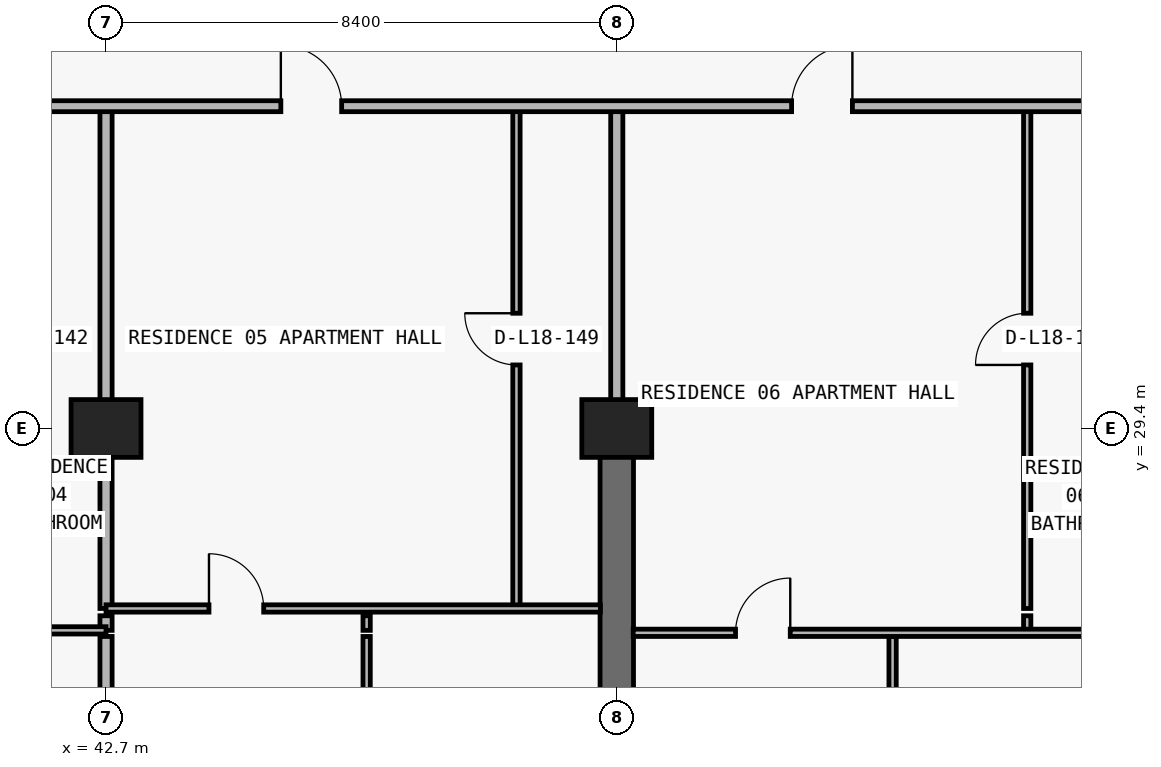
"""IFC4 building model, lengths in metres.
Left out: names, types, materials, properties, quantities, classifications, styles, units other than length and angle.
Written with IfcOpenShell. Run it as: python <this file> out.ifc"""

import sys

from ifc_helpers import new_model, si_unit, direction, frame, frame_2d, origin, origin_2d, place, context, subcontext, project, spatial, rectangle, extrude, element, fill, save


model = new_model("IFC4")
c1 = context("Model", 3, precision=1e-05, world=origin(), true_north=direction((0.0, 1.0)))
c2 = subcontext(c1, "Body", "Model", "MODEL_VIEW")
j1 = project(units=[si_unit("LENGTHUNIT", "METRE"), si_unit("PLANEANGLEUNIT", "RADIAN")], contexts=[c1])
p1 = place(None, origin())
s1 = spatial("IfcSite", under=j1, at=p1, CompositionType="ELEMENT")
p2 = place(p1, origin())
s2 = spatial("IfcBuilding", under=s1, at=p2, CompositionType="ELEMENT")
p3 = place(p2, frame((0.0, 0.0, 69.6)))
s3 = spatial("IfcBuildingStorey", under=s2, at=p3, CompositionType="ELEMENT", Elevation=69.6)
for number, where, z_axis, x_axis in (
    (1, (42.7, 29.4, 0.0), (0.0, 0.0, 1.0), (1.0, 0.0, 0.0)),
    (2, (51.1, 29.4, 0.0), (0.0, 0.0, 1.0), (1.0, 0.0, 0.0)),
):
    element("IfcColumn", number, at=place(p3, frame(where, z_axis=z_axis, x_axis=x_axis)), inside=s3, PredefinedType="COLUMN", context=c2, shape_type="SweptSolid", body=[
        extrude(rectangle(XDim=1.15, YDim=0.95, at=origin_2d()), origin(), (0.0, 0.0, 1.0), 3.05),
    ])
p4 = place(p3, frame((51.1, 20.8, 0.0), z_axis=(0.0, 0.0, 1.0), x_axis=(0.0, 1.0, 0.0)))
e3 = element("IfcWall", 3, at=p4, inside=s3, PredefinedType="SHEAR", context=c2, shape_type="SweptSolid", body=[
    extrude(rectangle(XDim=8.6, YDim=0.55, at=frame_2d((4.3, 0.0))), origin(), (0.0, 0.0, 1.0), 3.05),
])
p5 = place(p3, frame((42.7, 21.29, 0.0), z_axis=(0.0, 0.0, 1.0), x_axis=(0.0, 1.0, 0.0)))
e4 = element("IfcWall", 4, at=p5, inside=s3, PredefinedType="PARTITIONING", context=c2, shape_type="SweptSolid", body=[
    extrude(rectangle(XDim=4.69, YDim=0.2, at=frame_2d((2.345, 0.0))), origin(), (0.0, 0.0, 1.0), 2.11),
])
p6 = place(p3, frame((42.7, 26.08, 0.0), z_axis=(0.0, 0.0, 1.0), x_axis=(0.0, 1.0, 0.0)))
e5 = element("IfcWall", 5, at=p6, inside=s3, PredefinedType="PARTITIONING", context=c2, shape_type="SweptSolid", body=[
    extrude(rectangle(XDim=0.24, YDim=0.2, at=frame_2d((0.12, 0.0))), origin(), (0.0, 0.0, 1.0), 2.11),
])
p7 = place(p3, frame((42.7, 26.44, 0.0), z_axis=(0.0, 0.0, 1.0), x_axis=(0.0, 1.0, 0.0)))
e6 = element("IfcWall", 6, at=p7, inside=s3, PredefinedType="PARTITIONING", context=c2, shape_type="SweptSolid", body=[
    extrude(rectangle(XDim=8.26, YDim=0.2, at=frame_2d((4.13, 0.0))), origin(), (0.0, 0.0, 1.0), 2.11),
])
p8 = place(p3, frame((46.986, 21.29, 0.0), z_axis=(0.0, 0.0, 1.0), x_axis=(0.0, 1.0, 0.0)))
e7 = element("IfcWall", 7, at=p8, inside=s3, PredefinedType="PARTITIONING", context=c2, shape_type="SweptSolid", body=[
    extrude(rectangle(XDim=4.69, YDim=0.12, at=frame_2d((2.345, 0.0))), origin(), (0.0, 0.0, 1.0), 3.05),
])
p9 = place(p8, frame((1.895, 0.0, 0.0)))
e8 = element("IfcOpeningElement", 8, at=p9, cuts=e7, PredefinedType="OPENING", context=c2, shape_type="SweptSolid", body=[
    extrude(rectangle(XDim=0.9, YDim=2.15, at=frame_2d((0.45, 1.075))), frame((0.0, 0.07, 0.0), z_axis=(0.0, -1.0, 0.0), x_axis=(1.0, 0.0, 0.0)), (0.0, 0.0, 1.0), 0.14),
])
p10 = place(p3, frame((46.986, 26.08, 0.0), z_axis=(0.0, 0.0, 1.0), x_axis=(0.0, 1.0, 0.0)))
e9 = element("IfcWall", 9, at=p10, inside=s3, PredefinedType="PARTITIONING", context=c2, shape_type="SweptSolid", body=[
    extrude(rectangle(XDim=0.24, YDim=0.12, at=frame_2d((0.12, 0.0))), origin(), (0.0, 0.0, 1.0), 3.05),
])
p11 = place(p3, frame((49.45, 26.44, 0.0), z_axis=(0.0, 0.0, 1.0), x_axis=(0.0, 1.0, 0.0)))
e10 = element("IfcWall", 10, at=p11, inside=s3, PredefinedType="PARTITIONING", context=c2, shape_type="SweptSolid", body=[
    extrude(rectangle(XDim=8.26, YDim=0.12, at=frame_2d((4.13, 0.0))), origin(), (0.0, 0.0, 1.0), 3.05),
])
p12 = place(p11, frame((4.005, 0.0, 0.0)))
e11 = element("IfcOpeningElement", 11, at=p12, cuts=e10, PredefinedType="OPENING", context=c2, shape_type="SweptSolid", body=[
    extrude(rectangle(XDim=0.85, YDim=2.1, at=frame_2d((0.425, 1.05))), frame((0.0, 0.07, 0.0), z_axis=(0.0, -1.0, 0.0), x_axis=(1.0, 0.0, 0.0)), (0.0, 0.0, 1.0), 0.14),
])
p13 = place(p3, frame((51.1, 29.405, 0.0), z_axis=(0.0, 0.0, 1.0), x_axis=(0.0, 1.0, 0.0)))
e12 = element("IfcWall", 12, at=p13, inside=s3, PredefinedType="PARTITIONING", context=c2, shape_type="SweptSolid", body=[
    extrude(rectangle(XDim=5.295, YDim=0.2, at=frame_2d((2.647, 0.0))), origin(), (0.0, 0.0, 1.0), 2.335),
])
p14 = place(p3, frame((55.636, 21.29, 0.0), z_axis=(0.0, 0.0, 1.0), x_axis=(0.0, 1.0, 0.0)))
e13 = element("IfcWall", 13, at=p14, inside=s3, PredefinedType="PARTITIONING", context=c2, shape_type="SweptSolid", body=[
    extrude(rectangle(XDim=4.69, YDim=0.12, at=frame_2d((2.345, 0.0))), origin(), (0.0, 0.0, 1.0), 3.05),
])
p15 = place(p14, frame((1.895, 0.0, 0.0)))
e14 = element("IfcOpeningElement", 14, at=p15, cuts=e13, PredefinedType="OPENING", context=c2, shape_type="SweptSolid", body=[
    extrude(rectangle(XDim=0.9, YDim=2.15, at=frame_2d((0.45, 1.075))), frame((0.0, 0.07, 0.0), z_axis=(0.0, -1.0, 0.0), x_axis=(1.0, 0.0, 0.0)), (0.0, 0.0, 1.0), 0.14),
])
p16 = place(p3, frame((57.85, 26.08, 0.0), z_axis=(0.0, 0.0, 1.0), x_axis=(0.0, 1.0, 0.0)))
e15 = element("IfcWall", 15, at=p16, inside=s3, PredefinedType="PARTITIONING", context=c2, shape_type="SweptSolid", body=[
    extrude(rectangle(XDim=0.24, YDim=0.12, at=frame_2d((0.12, 0.0))), origin(), (0.0, 0.0, 1.0), 3.05),
])
p17 = place(p3, frame((57.85, 26.44, 0.0), z_axis=(0.0, 0.0, 1.0), x_axis=(0.0, 1.0, 0.0)))
e16 = element("IfcWall", 16, at=p17, inside=s3, PredefinedType="PARTITIONING", context=c2, shape_type="SweptSolid", body=[
    extrude(rectangle(XDim=8.26, YDim=0.12, at=frame_2d((4.13, 0.0))), origin(), (0.0, 0.0, 1.0), 3.05),
])
p18 = place(p17, frame((4.005, 0.0, 0.0)))
e17 = element("IfcOpeningElement", 17, at=p18, cuts=e16, PredefinedType="OPENING", context=c2, shape_type="SweptSolid", body=[
    extrude(rectangle(XDim=0.85, YDim=2.1, at=frame_2d((0.425, 1.05))), frame((0.0, 0.07, 0.0), z_axis=(0.0, -1.0, 0.0), x_axis=(1.0, 0.0, 0.0)), (0.0, 0.0, 1.0), 0.14),
])
p19 = place(p3, frame((51.37, 26.04, 0.0), z_axis=(0.0, 0.0, 1.0), x_axis=(1.0, 0.0, 0.0)))
e18 = element("IfcWall", 18, at=p19, inside=s3, PredefinedType="PARTITIONING", context=c2, shape_type="SweptSolid", body=[
    extrude(rectangle(XDim=8.13, YDim=0.12, at=frame_2d((4.065, 0.0))), origin(), (0.0, 0.0, 1.0), 3.05),
])
p20 = place(p19, frame((1.683, 0.0, 0.0)))
e19 = element("IfcOpeningElement", 19, at=p20, cuts=e18, PredefinedType="OPENING", context=c2, shape_type="SweptSolid", body=[
    extrude(rectangle(XDim=0.9, YDim=2.15, at=frame_2d((0.45, 1.075))), frame((0.0, 0.07, 0.0), z_axis=(0.0, -1.0, 0.0), x_axis=(1.0, 0.0, 0.0)), (0.0, 0.0, 1.0), 0.14),
])
p21 = place(p3, frame((35.1, 26.08, 0.0), z_axis=(0.0, 0.0, 1.0), x_axis=(1.0, 0.0, 0.0)))
e20 = element("IfcWall", 20, at=p21, inside=s3, PredefinedType="PARTITIONING", context=c2, shape_type="SweptSolid", body=[
    extrude(rectangle(XDim=7.6, YDim=0.12, at=frame_2d((3.8, 0.0))), origin(), (0.0, 0.0, 1.0), 3.05),
])
p22 = place(p21, frame((1.727, 0.0, 0.0)))
e21 = element("IfcOpeningElement", 21, at=p22, cuts=e20, PredefinedType="OPENING", context=c2, shape_type="SweptSolid", body=[
    extrude(rectangle(XDim=0.9, YDim=2.15, at=frame_2d((0.45, 1.075))), frame((0.0, 0.07, 0.0), z_axis=(0.0, -1.0, 0.0), x_axis=(1.0, 0.0, 0.0)), (0.0, 0.0, 1.0), 0.14),
])
p23 = place(p3, frame((42.7, 26.44, 0.0), z_axis=(0.0, 0.0, 1.0), x_axis=(1.0, 0.0, 0.0)))
e22 = element("IfcWall", 22, at=p23, inside=s3, PredefinedType="PARTITIONING", context=c2, shape_type="SweptSolid", body=[
    extrude(rectangle(XDim=8.13, YDim=0.12, at=frame_2d((4.065, 0.0))), origin(), (0.0, 0.0, 1.0), 3.05),
])
p24 = place(p23, frame((1.693, 0.0, 0.0)))
e23 = element("IfcOpeningElement", 23, at=p24, cuts=e22, PredefinedType="OPENING", context=c2, shape_type="SweptSolid", body=[
    extrude(rectangle(XDim=0.9, YDim=2.15, at=frame_2d((0.45, 1.075))), frame((0.0, 0.07, 0.0), z_axis=(0.0, -1.0, 0.0), x_axis=(1.0, 0.0, 0.0)), (0.0, 0.0, 1.0), 0.14),
])
p25 = place(p3, frame((5.105, 34.7, 0.0), z_axis=(0.0, 0.0, 1.0), x_axis=(1.0, 0.0, 0.0)))
e24 = element("IfcWall", 24, at=p25, inside=s3, PredefinedType="PARTITIONING", context=c2, shape_type="SweptSolid", body=[
    extrude(rectangle(XDim=67.595, YDim=0.18, at=frame_2d((33.797, 0.0))), origin(), (0.0, 0.0, 1.0), 3.05),
])
p26 = place(p25, frame((7.67, 0.0, 0.0)))
e25 = element("IfcOpeningElement", 25, at=p26, cuts=e24, PredefinedType="OPENING", context=c2, shape_type="SweptSolid", body=[
    extrude(rectangle(XDim=1.0, YDim=2.2, at=frame_2d((0.5, 1.1))), frame((0.0, 0.1, 0.0), z_axis=(0.0, -1.0, 0.0), x_axis=(1.0, 0.0, 0.0)), (0.0, 0.0, 1.0), 0.2),
])
p27 = place(p25, frame((16.07, 0.0, 0.0)))
e26 = element("IfcOpeningElement", 26, at=p27, cuts=e24, PredefinedType="OPENING", context=c2, shape_type="SweptSolid", body=[
    extrude(rectangle(XDim=1.0, YDim=2.2, at=frame_2d((0.5, 1.1))), frame((0.0, 0.1, 0.0), z_axis=(0.0, -1.0, 0.0), x_axis=(1.0, 0.0, 0.0)), (0.0, 0.0, 1.0), 0.2),
])
p28 = place(p25, frame((24.47, 0.0, 0.0)))
e27 = element("IfcOpeningElement", 27, at=p28, cuts=e24, PredefinedType="OPENING", context=c2, shape_type="SweptSolid", body=[
    extrude(rectangle(XDim=1.0, YDim=2.2, at=frame_2d((0.5, 1.1))), frame((0.0, 0.1, 0.0), z_axis=(0.0, -1.0, 0.0), x_axis=(1.0, 0.0, 0.0)), (0.0, 0.0, 1.0), 0.2),
])
p29 = place(p25, frame((32.47, 0.0, 0.0)))
e28 = element("IfcOpeningElement", 28, at=p29, cuts=e24, PredefinedType="OPENING", context=c2, shape_type="SweptSolid", body=[
    extrude(rectangle(XDim=1.0, YDim=2.2, at=frame_2d((0.5, 1.1))), frame((0.0, 0.1, 0.0), z_axis=(0.0, -1.0, 0.0), x_axis=(1.0, 0.0, 0.0)), (0.0, 0.0, 1.0), 0.2),
])
p30 = place(p25, frame((40.47, 0.0, 0.0)))
e29 = element("IfcOpeningElement", 29, at=p30, cuts=e24, PredefinedType="OPENING", context=c2, shape_type="SweptSolid", body=[
    extrude(rectangle(XDim=1.0, YDim=2.2, at=frame_2d((0.5, 1.1))), frame((0.0, 0.1, 0.0), z_axis=(0.0, -1.0, 0.0), x_axis=(1.0, 0.0, 0.0)), (0.0, 0.0, 1.0), 0.2),
])
p31 = place(p25, frame((48.87, 0.0, 0.0)))
e30 = element("IfcOpeningElement", 30, at=p31, cuts=e24, PredefinedType="OPENING", context=c2, shape_type="SweptSolid", body=[
    extrude(rectangle(XDim=1.0, YDim=2.2, at=frame_2d((0.5, 1.1))), frame((0.0, 0.1, 0.0), z_axis=(0.0, -1.0, 0.0), x_axis=(1.0, 0.0, 0.0)), (0.0, 0.0, 1.0), 0.2),
])
p32 = place(p25, frame((57.27, 0.0, 0.0)))
e31 = element("IfcOpeningElement", 31, at=p32, cuts=e24, PredefinedType="OPENING", context=c2, shape_type="SweptSolid", body=[
    extrude(rectangle(XDim=1.0, YDim=2.2, at=frame_2d((0.5, 1.1))), frame((0.0, 0.1, 0.0), z_axis=(0.0, -1.0, 0.0), x_axis=(1.0, 0.0, 0.0)), (0.0, 0.0, 1.0), 0.2),
])
p33 = place(p30, origin())
e32 = element("IfcDoor", 32, at=p33, inside=s3, OperationType="SINGLE_SWING_LEFT", PredefinedType="DOOR", context=c2, shape_type="SweptSolid", body=[
    extrude(rectangle(XDim=1.0, YDim=2.2, at=frame_2d((0.5, 1.1))), frame((0.0, 0.025, 0.0), z_axis=(0.0, -1.0, 0.0), x_axis=(1.0, 0.0, 0.0)), (0.0, 0.0, 1.0), 0.05),
])
fill(e29, e32)
p34 = place(p12, origin())
e33 = element("IfcDoor", 33, at=p34, inside=s3, OperationType="SINGLE_SWING_RIGHT", PredefinedType="DOOR", context=c2, shape_type="SweptSolid", body=[
    extrude(rectangle(XDim=0.85, YDim=2.1, at=frame_2d((0.425, 1.05))), frame((0.0, 0.025, 0.0), z_axis=(0.0, -1.0, 0.0), x_axis=(1.0, 0.0, 0.0)), (0.0, 0.0, 1.0), 0.05),
])
fill(e11, e33)
p35 = place(p24, origin())
e34 = element("IfcDoor", 34, at=p35, inside=s3, OperationType="SINGLE_SWING_LEFT", PredefinedType="DOOR", context=c2, shape_type="SweptSolid", body=[
    extrude(rectangle(XDim=0.9, YDim=2.15, at=frame_2d((0.45, 1.075))), frame((0.0, 0.025, 0.0), z_axis=(0.0, -1.0, 0.0), x_axis=(1.0, 0.0, 0.0)), (0.0, 0.0, 1.0), 0.05),
])
fill(e23, e34)
p36 = place(p31, origin())
e35 = element("IfcDoor", 35, at=p36, inside=s3, OperationType="SINGLE_SWING_RIGHT", PredefinedType="DOOR", context=c2, shape_type="SweptSolid", body=[
    extrude(rectangle(XDim=1.0, YDim=2.2, at=frame_2d((0.5, 1.1))), frame((0.0, 0.025, 0.0), z_axis=(0.0, -1.0, 0.0), x_axis=(1.0, 0.0, 0.0)), (0.0, 0.0, 1.0), 0.05),
])
fill(e30, e35)
p37 = place(p18, origin())
e36 = element("IfcDoor", 36, at=p37, inside=s3, OperationType="SINGLE_SWING_LEFT", PredefinedType="DOOR", context=c2, shape_type="SweptSolid", body=[
    extrude(rectangle(XDim=0.85, YDim=2.1, at=frame_2d((0.425, 1.05))), frame((0.0, 0.025, 0.0), z_axis=(0.0, -1.0, 0.0), x_axis=(1.0, 0.0, 0.0)), (0.0, 0.0, 1.0), 0.05),
])
fill(e17, e36)
p38 = place(p20, origin())
e37 = element("IfcDoor", 37, at=p38, inside=s3, OperationType="SINGLE_SWING_RIGHT", PredefinedType="DOOR", context=c2, shape_type="SweptSolid", body=[
    extrude(rectangle(XDim=0.9, YDim=2.15, at=frame_2d((0.45, 1.075))), frame((0.0, 0.025, 0.0), z_axis=(0.0, -1.0, 0.0), x_axis=(1.0, 0.0, 0.0)), (0.0, 0.0, 1.0), 0.05),
])
fill(e19, e37)
save(model, sys.argv[1])
